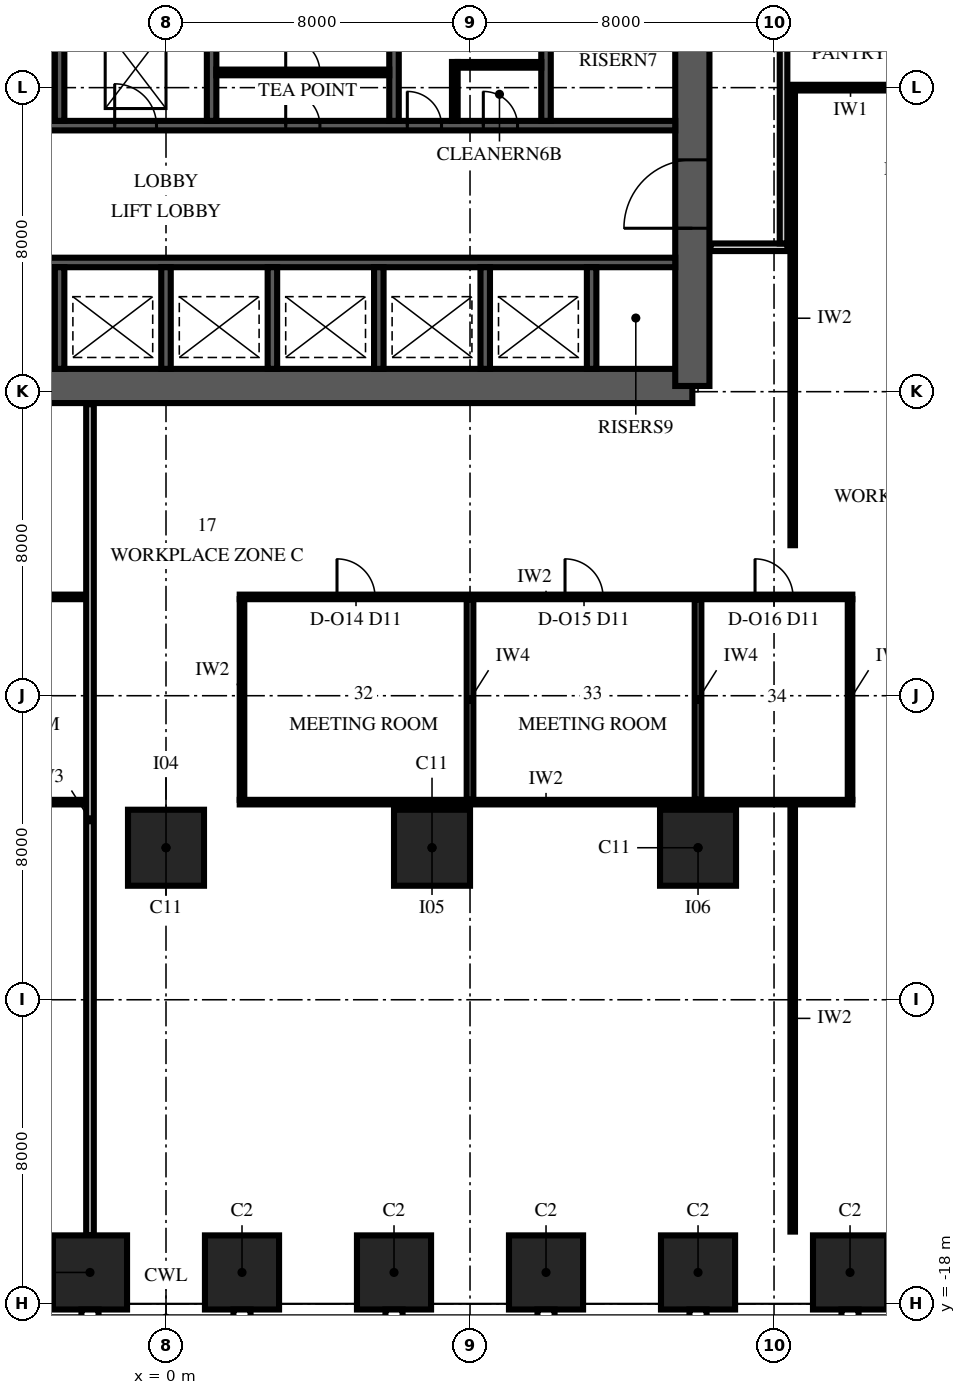
"""IFC4 building model, lengths in metres.
Left out: names, types, materials, properties, quantities, classifications, styles, units other than length and angle.
Written with IfcOpenShell. Run it as: python <this file> out.ifc"""

import sys

from ifc_helpers import new_model, si_unit, direction, frame, frame_2d, origin, origin_2d, place, context, subcontext, project, spatial, polyline, rectangle, outline, extrude, element, fill, save


model = new_model("IFC4")
c1 = context("Model", 3, precision=1e-05, world=origin(), true_north=direction((0.0, 1.0)))
c2 = subcontext(c1, "Body", "Model", "MODEL_VIEW")
j1 = project(units=[si_unit("LENGTHUNIT", "METRE"), si_unit("PLANEANGLEUNIT", "RADIAN")], contexts=[c1])
p1 = place(None, origin())
s1 = spatial("IfcSite", under=j1, at=p1, CompositionType="ELEMENT")
p2 = place(p1, origin())
s2 = spatial("IfcBuilding", under=s1, at=p2, CompositionType="ELEMENT")
p3 = place(p2, frame((0.0, 0.0, 60.0)))
s3 = spatial("IfcBuildingStorey", under=s2, at=p3, CompositionType="ELEMENT", Elevation=60.0)
for number, where, z_axis, x_axis in (
    (1, (-2.0, -17.175, 0.0), (0.0, 0.0, 1.0), (1.0, 0.0, 0.0)),
    (2, (2.0, -17.175, 0.0), (0.0, 0.0, 1.0), (1.0, 0.0, 0.0)),
    (3, (6.0, -17.175, 0.0), (0.0, 0.0, 1.0), (1.0, 0.0, 0.0)),
    (4, (10.0, -17.175, 0.0), (0.0, 0.0, 1.0), (1.0, 0.0, 0.0)),
    (5, (14.0, -17.175, 0.0), (0.0, 0.0, 1.0), (1.0, 0.0, 0.0)),
    (6, (18.0, -17.175, 0.0), (0.0, 0.0, 1.0), (1.0, 0.0, 0.0)),
):
    element("IfcColumn", number, at=place(p3, frame(where, z_axis=z_axis, x_axis=x_axis)), inside=s3, PredefinedType="COLUMN", context=c2, shape_type="SweptSolid", body=[
        extrude(rectangle(XDim=1.95, YDim=1.95, at=origin_2d()), origin(), (0.0, 0.0, 1.0), 4.0),
    ])
for number, where, z_axis, x_axis in (
    (7, (0.0, -6.0, 0.0), (0.0, 0.0, 1.0), (1.0, 0.0, 0.0)),
    (8, (7.0, -6.0, 0.0), (0.0, 0.0, 1.0), (1.0, 0.0, 0.0)),
    (9, (14.0, -6.0, 0.0), (0.0, 0.0, 1.0), (1.0, 0.0, 0.0)),
):
    element("IfcColumn", number, at=place(p3, frame(where, z_axis=z_axis, x_axis=x_axis)), inside=s3, PredefinedType="COLUMN", context=c2, shape_type="SweptSolid", body=[
        extrude(rectangle(XDim=2.0, YDim=2.0, at=origin_2d()), origin(), (0.0, 0.0, 1.0), 4.0),
    ])
p4 = place(p3, frame((-13.85, 6.15, 0.0), z_axis=(0.0, 0.0, 1.0), x_axis=(1.0, 0.0, 0.0)))
e10 = element("IfcWall", 10, at=p4, inside=s3, PredefinedType="SHEAR", context=c2, shape_type="SweptSolid", body=[
    extrude(rectangle(XDim=27.7, YDim=0.9, at=frame_2d((13.85, 0.0))), origin(), (0.0, 0.0, 1.0), 4.0),
])
p5 = place(p3, frame((13.85, 6.15, 0.0), z_axis=(0.0, 0.0, 1.0), x_axis=(0.0, 1.0, 0.0)))
e11 = element("IfcWall", 11, at=p5, inside=s3, PredefinedType="SHEAR", context=c2, shape_type="SweptSolid", body=[
    extrude(outline(polyline([(0.0, -0.45), (17.7, -0.45), (17.7, 0.0), (17.25, 0.0), (17.25, 0.45), (0.45, 0.45), (0.45, 0.0), (0.0, 0.0), (0.0, -0.45)])), origin(), (0.0, 0.0, 1.0), 4.0),
])
p6 = place(p5, frame((4.15, 0.0, 0.0)))
e12 = element("IfcOpeningElement", 12, at=p6, cuts=e11, PredefinedType="OPENING", context=c2, shape_type="SweptSolid", body=[
    extrude(rectangle(XDim=1.8, YDim=2.4, at=frame_2d((0.9, 1.2))), frame((0.0, 0.465, 0.0), z_axis=(0.0, -1.0, 0.0), x_axis=(1.0, 0.0, 0.0)), (0.0, 0.0, 1.0), 0.93),
])
p7 = place(p3, frame((-13.4, 9.4, 0.0), z_axis=(0.0, 0.0, 1.0), x_axis=(1.0, 0.0, 0.0)))
e13 = element("IfcWall", 13, at=p7, inside=s3, PredefinedType="SHEAR", context=c2, shape_type="SweptSolid", body=[
    extrude(rectangle(XDim=26.8, YDim=0.25, at=frame_2d((13.4, 0.0))), origin(), (0.0, 0.0, 1.0), 4.0),
])
p8 = place(p7, frame((0.25, 0.0, 0.0)))
e14 = element("IfcOpeningElement", 14, at=p8, cuts=e13, PredefinedType="OPENING", context=c2, shape_type="SweptSolid", body=[
    extrude(rectangle(XDim=1.1, YDim=2.1, at=frame_2d((0.55, 1.05))), frame((0.0, 0.14, 0.0), z_axis=(0.0, -1.0, 0.0), x_axis=(1.0, 0.0, 0.0)), (0.0, 0.0, 1.0), 0.28),
])
p9 = place(p7, frame((3.05, 0.0, 0.0)))
e15 = element("IfcOpeningElement", 15, at=p9, cuts=e13, PredefinedType="OPENING", context=c2, shape_type="SweptSolid", body=[
    extrude(rectangle(XDim=1.1, YDim=2.1, at=frame_2d((0.55, 1.05))), frame((0.0, 0.14, 0.0), z_axis=(0.0, -1.0, 0.0), x_axis=(1.0, 0.0, 0.0)), (0.0, 0.0, 1.0), 0.28),
])
p10 = place(p7, frame((5.85, 0.0, 0.0)))
e16 = element("IfcOpeningElement", 16, at=p10, cuts=e13, PredefinedType="OPENING", context=c2, shape_type="SweptSolid", body=[
    extrude(rectangle(XDim=1.1, YDim=2.1, at=frame_2d((0.55, 1.05))), frame((0.0, 0.14, 0.0), z_axis=(0.0, -1.0, 0.0), x_axis=(1.0, 0.0, 0.0)), (0.0, 0.0, 1.0), 0.28),
])
p11 = place(p3, frame((-13.4, 13.0, 0.0), z_axis=(0.0, 0.0, 1.0), x_axis=(1.0, 0.0, 0.0)))
e17 = element("IfcWall", 17, at=p11, inside=s3, PredefinedType="SHEAR", context=c2, shape_type="SweptSolid", body=[
    extrude(rectangle(XDim=26.8, YDim=0.25, at=frame_2d((13.4, 0.0))), origin(), (0.0, 0.0, 1.0), 4.0),
])
p12 = place(p11, frame((0.25, 0.0, 0.0)))
e18 = element("IfcOpeningElement", 18, at=p12, cuts=e17, PredefinedType="OPENING", context=c2, shape_type="SweptSolid", body=[
    extrude(rectangle(XDim=1.1, YDim=2.1, at=frame_2d((0.55, 1.05))), frame((0.0, 0.14, 0.0), z_axis=(0.0, -1.0, 0.0), x_axis=(1.0, 0.0, 0.0)), (0.0, 0.0, 1.0), 0.28),
])
p13 = place(p11, frame((8.65, 0.0, 0.0)))
e19 = element("IfcOpeningElement", 19, at=p13, cuts=e17, PredefinedType="OPENING", context=c2, shape_type="SweptSolid", body=[
    extrude(rectangle(XDim=1.1, YDim=2.1, at=frame_2d((0.55, 1.05))), frame((0.0, 0.14, 0.0), z_axis=(0.0, -1.0, 0.0), x_axis=(1.0, 0.0, 0.0)), (0.0, 0.0, 1.0), 0.28),
])
p14 = place(p11, frame((12.05, 0.0, 0.0)))
e20 = element("IfcOpeningElement", 20, at=p14, cuts=e17, PredefinedType="OPENING", context=c2, shape_type="SweptSolid", body=[
    extrude(rectangle(XDim=1.1, YDim=2.1, at=frame_2d((0.55, 1.05))), frame((0.0, 0.14, 0.0), z_axis=(0.0, -1.0, 0.0), x_axis=(1.0, 0.0, 0.0)), (0.0, 0.0, 1.0), 0.28),
])
p15 = place(p11, frame((16.55, 0.0, 0.0)))
e21 = element("IfcOpeningElement", 21, at=p15, cuts=e17, PredefinedType="OPENING", context=c2, shape_type="SweptSolid", body=[
    extrude(rectangle(XDim=0.9, YDim=2.1, at=frame_2d((0.45, 1.05))), frame((0.0, 0.14, 0.0), z_axis=(0.0, -1.0, 0.0), x_axis=(1.0, 0.0, 0.0)), (0.0, 0.0, 1.0), 0.28),
])
p16 = place(p11, frame((19.75, 0.0, 0.0)))
e22 = element("IfcOpeningElement", 22, at=p16, cuts=e17, PredefinedType="OPENING", context=c2, shape_type="SweptSolid", body=[
    extrude(rectangle(XDim=0.9, YDim=2.1, at=frame_2d((0.45, 1.05))), frame((0.0, 0.14, 0.0), z_axis=(0.0, -1.0, 0.0), x_axis=(1.0, 0.0, 0.0)), (0.0, 0.0, 1.0), 0.28),
])
p17 = place(p11, frame((21.75, 0.0, 0.0)))
e23 = element("IfcOpeningElement", 23, at=p17, cuts=e17, PredefinedType="OPENING", context=c2, shape_type="SweptSolid", body=[
    extrude(rectangle(XDim=0.9, YDim=2.1, at=frame_2d((0.45, 1.05))), frame((0.0, 0.14, 0.0), z_axis=(0.0, -1.0, 0.0), x_axis=(1.0, 0.0, 0.0)), (0.0, 0.0, 1.0), 0.28),
])
for number, where, z_axis, x_axis in (
    (24, (-2.8, 6.6, 0.0), (0.0, 0.0, 1.0), (0.0, 1.0, 0.0)),
    (25, (0.0, 6.6, 0.0), (0.0, 0.0, 1.0), (0.0, 1.0, 0.0)),
    (26, (2.8, 6.6, 0.0), (0.0, 0.0, 1.0), (0.0, 1.0, 0.0)),
    (27, (5.6, 6.6, 0.0), (0.0, 0.0, 1.0), (0.0, 1.0, 0.0)),
    (28, (8.4, 6.6, 0.0), (0.0, 0.0, 1.0), (0.0, 1.0, 0.0)),
    (29, (11.2, 6.6, 0.0), (0.0, 0.0, 1.0), (0.0, 1.0, 0.0)),
):
    element("IfcWall", number, at=place(p3, frame(where, z_axis=z_axis, x_axis=x_axis)), inside=s3, PredefinedType="SHEAR", context=c2, shape_type="SweptSolid", body=[
        extrude(rectangle(XDim=2.675, YDim=0.25, at=frame_2d((1.337, 0.0))), origin(), (0.0, 0.0, 1.0), 4.0),
    ])
for number, where, z_axis, x_axis in (
    (30, (-2.8, 13.125, 0.0), (0.0, 0.0, 1.0), (0.0, 1.0, 0.0)),
    (31, (1.2, 13.125, 0.0), (0.0, 0.0, 1.0), (0.0, 1.0, 0.0)),
    (32, (6.0, 13.125, 0.0), (0.0, 0.0, 1.0), (0.0, 1.0, 0.0)),
    (33, (10.0, 13.125, 0.0), (0.0, 0.0, 1.0), (0.0, 1.0, 0.0)),
):
    element("IfcWall", number, at=place(p3, frame(where, z_axis=z_axis, x_axis=x_axis)), inside=s3, PredefinedType="SHEAR", context=c2, shape_type="SweptSolid", body=[
        extrude(rectangle(XDim=2.75, YDim=0.25, at=frame_2d((1.375, 0.0))), origin(), (0.0, 0.0, 1.0), 4.0),
    ])
p18 = place(p3, frame((1.325, 14.4, 0.0), z_axis=(0.0, 0.0, 1.0), x_axis=(1.0, 0.0, 0.0)))
e34 = element("IfcWall", 34, at=p18, inside=s3, PredefinedType="PARTITIONING", context=c2, shape_type="SweptSolid", body=[
    extrude(rectangle(XDim=4.55, YDim=0.15, at=frame_2d((2.275, 0.0))), origin(), (0.0, 0.0, 1.0), 3.85),
])
p19 = place(p18, frame((1.825, 0.0, 0.0)))
e35 = element("IfcOpeningElement", 35, at=p19, cuts=e34, PredefinedType="OPENING", context=c2, shape_type="SweptSolid", body=[
    extrude(rectangle(XDim=0.9, YDim=2.1, at=frame_2d((0.45, 1.05))), frame((0.0, 0.09, 0.0), z_axis=(0.0, -1.0, 0.0), x_axis=(1.0, 0.0, 0.0)), (0.0, 0.0, 1.0), 0.18),
])
p20 = place(p3, frame((7.6, 13.125, 0.0), z_axis=(0.0, 0.0, 1.0), x_axis=(0.0, 1.0, 0.0)))
e36 = element("IfcWall", 36, at=p20, inside=s3, PredefinedType="PARTITIONING", context=c2, shape_type="SweptSolid", body=[
    extrude(rectangle(XDim=1.55, YDim=0.15, at=frame_2d((0.775, 0.0))), origin(), (0.0, 0.0, 1.0), 3.85),
])
p21 = place(p3, frame((7.675, 14.6, 0.0), z_axis=(0.0, 0.0, 1.0), x_axis=(1.0, 0.0, 0.0)))
e37 = element("IfcWall", 37, at=p21, inside=s3, PredefinedType="PARTITIONING", context=c2, shape_type="SweptSolid", body=[
    extrude(rectangle(XDim=2.2, YDim=0.15, at=frame_2d((1.1, 0.0))), origin(), (0.0, 0.0, 1.0), 3.85),
])
p22 = place(p3, frame((-14.06, -4.8, 0.0), z_axis=(0.0, 0.0, 1.0), x_axis=(1.0, 0.0, 0.0)))
e38 = element("IfcWall", 38, at=p22, inside=s3, PredefinedType="PARTITIONING", context=c2, shape_type="SweptSolid", body=[
    extrude(rectangle(XDim=11.96, YDim=0.12, at=frame_2d((5.98, 0.0))), origin(), (0.0, 0.0, 1.0), 3.25),
])
p23 = place(p3, frame((1.94, -4.8, 0.0), z_axis=(0.0, 0.0, 1.0), x_axis=(1.0, 0.0, 0.0)))
e39 = element("IfcWall", 39, at=p23, inside=s3, PredefinedType="PARTITIONING", context=c2, shape_type="SweptSolid", body=[
    extrude(rectangle(XDim=16.12, YDim=0.12, at=frame_2d((8.06, 0.0))), origin(), (0.0, 0.0, 1.0), 3.25),
])
p24 = place(p3, frame((-14.06, 0.6, 0.0), z_axis=(0.0, 0.0, 1.0), x_axis=(1.0, 0.0, 0.0)))
e40 = element("IfcWall", 40, at=p24, inside=s3, PredefinedType="PARTITIONING", context=c2, shape_type="SweptSolid", body=[
    extrude(rectangle(XDim=11.96, YDim=0.12, at=frame_2d((5.98, 0.0))), origin(), (0.0, 0.0, 1.0), 3.25),
])
p25 = place(p24, frame((2.56, 0.0, 0.0)))
e41 = element("IfcOpeningElement", 41, at=p25, cuts=e40, PredefinedType="OPENING", context=c2, shape_type="SweptSolid", body=[
    extrude(rectangle(XDim=1.0, YDim=2.4, at=frame_2d((0.5, 1.2))), frame((0.0, 0.075, 0.0), z_axis=(0.0, -1.0, 0.0), x_axis=(1.0, 0.0, 0.0)), (0.0, 0.0, 1.0), 0.15),
])
p26 = place(p24, frame((8.56, 0.0, 0.0)))
e42 = element("IfcOpeningElement", 42, at=p26, cuts=e40, PredefinedType="OPENING", context=c2, shape_type="SweptSolid", body=[
    extrude(rectangle(XDim=1.0, YDim=2.4, at=frame_2d((0.5, 1.2))), frame((0.0, 0.075, 0.0), z_axis=(0.0, -1.0, 0.0), x_axis=(1.0, 0.0, 0.0)), (0.0, 0.0, 1.0), 0.15),
])
p27 = place(p3, frame((1.94, 0.6, 0.0), z_axis=(0.0, 0.0, 1.0), x_axis=(1.0, 0.0, 0.0)))
e43 = element("IfcWall", 43, at=p27, inside=s3, PredefinedType="PARTITIONING", context=c2, shape_type="SweptSolid", body=[
    extrude(rectangle(XDim=16.12, YDim=0.12, at=frame_2d((8.06, 0.0))), origin(), (0.0, 0.0, 1.0), 3.25),
])
p28 = place(p27, frame((2.56, 0.0, 0.0)))
e44 = element("IfcOpeningElement", 44, at=p28, cuts=e43, PredefinedType="OPENING", context=c2, shape_type="SweptSolid", body=[
    extrude(rectangle(XDim=1.0, YDim=2.4, at=frame_2d((0.5, 1.2))), frame((0.0, 0.075, 0.0), z_axis=(0.0, -1.0, 0.0), x_axis=(1.0, 0.0, 0.0)), (0.0, 0.0, 1.0), 0.15),
])
p29 = place(p27, frame((8.56, 0.0, 0.0)))
e45 = element("IfcOpeningElement", 45, at=p29, cuts=e43, PredefinedType="OPENING", context=c2, shape_type="SweptSolid", body=[
    extrude(rectangle(XDim=1.0, YDim=2.4, at=frame_2d((0.5, 1.2))), frame((0.0, 0.075, 0.0), z_axis=(0.0, -1.0, 0.0), x_axis=(1.0, 0.0, 0.0)), (0.0, 0.0, 1.0), 0.15),
])
p30 = place(p27, frame((13.56, 0.0, 0.0)))
e46 = element("IfcOpeningElement", 46, at=p30, cuts=e43, PredefinedType="OPENING", context=c2, shape_type="SweptSolid", body=[
    extrude(rectangle(XDim=1.0, YDim=2.4, at=frame_2d((0.5, 1.2))), frame((0.0, 0.075, 0.0), z_axis=(0.0, -1.0, 0.0), x_axis=(1.0, 0.0, 0.0)), (0.0, 0.0, 1.0), 0.15),
])
p31 = place(p3, frame((14.33, 9.8, 0.0), z_axis=(0.0, 0.0, 1.0), x_axis=(1.0, 0.0, 0.0)))
e47 = element("IfcWall", 47, at=p31, inside=s3, PredefinedType="PARTITIONING", context=c2, shape_type="SweptSolid", body=[
    extrude(rectangle(XDim=2.02, YDim=0.2, at=frame_2d((1.01, 0.0))), origin(), (0.0, 0.0, 1.0), 3.85),
])
p32 = place(p3, frame((16.35, 14.0, 0.0), z_axis=(0.0, 0.0, 1.0), x_axis=(1.0, 0.0, 0.0)))
e48 = element("IfcWall", 48, at=p32, inside=s3, PredefinedType="PARTITIONING", context=c2, shape_type="SweptSolid", body=[
    extrude(rectangle(XDim=3.325, YDim=0.15, at=frame_2d((1.663, 0.0))), origin(), (0.0, 0.0, 1.0), 3.85),
])
p33 = place(p3, frame((-2.0, -16.2, 0.0), z_axis=(0.0, 0.0, 1.0), x_axis=(0.0, 1.0, 0.0)))
e49 = element("IfcWall", 49, at=p33, inside=s3, PredefinedType="PARTITIONING", context=c2, shape_type="SweptSolid", body=[
    extrude(rectangle(XDim=21.87, YDim=0.2, at=frame_2d((10.935, 0.0))), origin(), (0.0, 0.0, 1.0), 2.842),
])
p34 = place(p3, frame((2.0, -4.74, 0.0), z_axis=(0.0, 0.0, 1.0), x_axis=(0.0, 1.0, 0.0)))
e50 = element("IfcWall", 50, at=p34, inside=s3, PredefinedType="PARTITIONING", context=c2, shape_type="SweptSolid", body=[
    extrude(rectangle(XDim=5.28, YDim=0.12, at=frame_2d((2.64, 0.0))), origin(), (0.0, 0.0, 1.0), 3.25),
])
p35 = place(p3, frame((8.0, -4.74, 0.0), z_axis=(0.0, 0.0, 1.0), x_axis=(0.0, 1.0, 0.0)))
e51 = element("IfcWall", 51, at=p35, inside=s3, PredefinedType="PARTITIONING", context=c2, shape_type="SweptSolid", body=[
    extrude(rectangle(XDim=5.28, YDim=0.175, at=frame_2d((2.64, 0.0))), origin(), (0.0, 0.0, 1.0), 3.85),
])
p36 = place(p3, frame((14.0, -4.74, 0.0), z_axis=(0.0, 0.0, 1.0), x_axis=(0.0, 1.0, 0.0)))
e52 = element("IfcWall", 52, at=p36, inside=s3, PredefinedType="PARTITIONING", context=c2, shape_type="SweptSolid", body=[
    extrude(rectangle(XDim=5.28, YDim=0.175, at=frame_2d((2.64, 0.0))), origin(), (0.0, 0.0, 1.0), 3.25),
])
p37 = place(p3, frame((16.25, 9.9, 0.0), z_axis=(0.0, 0.0, 1.0), x_axis=(0.0, 1.0, 0.0)))
e53 = element("IfcWall", 53, at=p37, inside=s3, PredefinedType="PARTITIONING", context=c2, shape_type="SweptSolid", body=[
    extrude(rectangle(XDim=16.25, YDim=0.2, at=frame_2d((8.125, 0.0))), origin(), (0.0, 0.0, 1.0), 3.25),
])
p38 = place(p3, frame((18.0, -4.74, 0.0), z_axis=(0.0, 0.0, 1.0), x_axis=(0.0, 1.0, 0.0)))
e54 = element("IfcWall", 54, at=p38, inside=s3, PredefinedType="PARTITIONING", context=c2, shape_type="SweptSolid", body=[
    extrude(rectangle(XDim=5.28, YDim=0.12, at=frame_2d((2.64, 0.0))), origin(), (0.0, 0.0, 1.0), 3.25),
])
p39 = place(p3, frame((16.491, -16.1, 0.0), z_axis=(0.0, 0.0, 1.0), x_axis=(0.0, 1.0, 0.0)))
e55 = element("IfcWall", 55, at=p39, inside=s3, PredefinedType="PARTITIONING", context=c2, shape_type="SweptSolid", body=[
    extrude(rectangle(XDim=11.22, YDim=0.12, at=frame_2d((5.61, 0.0))), origin(), (0.0, 0.0, 1.0), 2.842),
])
p40 = place(p3, frame((16.491, 1.96, 0.0), z_axis=(0.0, 0.0, 1.0), x_axis=(0.0, 1.0, 0.0)))
e56 = element("IfcWall", 56, at=p40, inside=s3, PredefinedType="PARTITIONING", context=c2, shape_type="SweptSolid", body=[
    extrude(rectangle(XDim=11.945, YDim=0.12, at=frame_2d((5.973, 0.0))), origin(), (0.0, 0.0, 1.0), 2.842),
])
p41 = place(p6, origin())
e57 = element("IfcDoor", 57, at=p41, inside=s3, OperationType="DOUBLE_DOOR_SINGLE_SWING", PredefinedType="DOOR", context=c2, shape_type="SweptSolid", body=[
    extrude(rectangle(XDim=1.8, YDim=2.4, at=frame_2d((0.9, 1.2))), frame((0.0, 0.45, 0.0), z_axis=(0.0, -1.0, 0.0), x_axis=(1.0, 0.0, 0.0)), (0.0, 0.0, 1.0), 0.899),
])
fill(e12, e57)
p42 = place(p14, origin())
e58 = element("IfcDoor", 58, at=p42, inside=s3, OperationType="SLIDING_TO_LEFT", PredefinedType="DOOR", context=c2, shape_type="SweptSolid", body=[
    extrude(rectangle(XDim=1.1, YDim=2.1, at=frame_2d((0.55, 1.05))), frame((0.0, 0.125, 0.0), z_axis=(0.0, -1.0, 0.0), x_axis=(1.0, 0.0, 0.0)), (0.0, 0.0, 1.0), 0.25),
])
fill(e20, e58)
p43 = place(p15, origin())
e59 = element("IfcDoor", 59, at=p43, inside=s3, OperationType="SINGLE_SWING_LEFT", PredefinedType="DOOR", context=c2, shape_type="SweptSolid", body=[
    extrude(rectangle(XDim=0.9, YDim=2.1, at=frame_2d((0.45, 1.05))), frame((0.0, 0.125, 0.0), z_axis=(0.0, -1.0, 0.0), x_axis=(1.0, 0.0, 0.0)), (0.0, 0.0, 1.0), 0.25),
])
fill(e21, e59)
p44 = place(p19, origin())
e60 = element("IfcDoor", 60, at=p44, inside=s3, OperationType="SINGLE_SWING_LEFT", PredefinedType="DOOR", context=c2, shape_type="SweptSolid", body=[
    extrude(rectangle(XDim=0.9, YDim=2.1, at=frame_2d((0.45, 1.05))), frame((0.0, 0.075, 0.0), z_axis=(0.0, -1.0, 0.0), x_axis=(1.0, 0.0, 0.0)), (0.0, 0.0, 1.0), 0.149),
])
fill(e35, e60)
p45 = place(p16, origin())
e61 = element("IfcDoor", 61, at=p45, inside=s3, OperationType="SINGLE_SWING_LEFT", PredefinedType="DOOR", context=c2, shape_type="SweptSolid", body=[
    extrude(rectangle(XDim=0.9, YDim=2.1, at=frame_2d((0.45, 1.05))), frame((0.0, 0.125, 0.0), z_axis=(0.0, -1.0, 0.0), x_axis=(1.0, 0.0, 0.0)), (0.0, 0.0, 1.0), 0.25),
])
fill(e22, e61)
p46 = place(p17, origin())
e62 = element("IfcDoor", 62, at=p46, inside=s3, OperationType="SINGLE_SWING_LEFT", PredefinedType="DOOR", context=c2, shape_type="SweptSolid", body=[
    extrude(rectangle(XDim=0.9, YDim=2.1, at=frame_2d((0.45, 1.05))), frame((0.0, 0.125, 0.0), z_axis=(0.0, -1.0, 0.0), x_axis=(1.0, 0.0, 0.0)), (0.0, 0.0, 1.0), 0.25),
])
fill(e23, e62)
p47 = place(p28, origin())
e63 = element("IfcDoor", 63, at=p47, inside=s3, OperationType="SINGLE_SWING_RIGHT", PredefinedType="DOOR", context=c2, shape_type="SweptSolid", body=[
    extrude(rectangle(XDim=1.0, YDim=2.4, at=frame_2d((0.5, 1.2))), frame((0.0, 0.06, 0.0), z_axis=(0.0, -1.0, 0.0), x_axis=(1.0, 0.0, 0.0)), (0.0, 0.0, 1.0), 0.12),
])
fill(e44, e63)
p48 = place(p29, origin())
e64 = element("IfcDoor", 64, at=p48, inside=s3, OperationType="SINGLE_SWING_RIGHT", PredefinedType="DOOR", context=c2, shape_type="SweptSolid", body=[
    extrude(rectangle(XDim=1.0, YDim=2.4, at=frame_2d((0.5, 1.2))), frame((0.0, 0.06, 0.0), z_axis=(0.0, -1.0, 0.0), x_axis=(1.0, 0.0, 0.0)), (0.0, 0.0, 1.0), 0.12),
])
fill(e45, e64)
p49 = place(p30, origin())
e65 = element("IfcDoor", 65, at=p49, inside=s3, OperationType="SINGLE_SWING_RIGHT", PredefinedType="DOOR", context=c2, shape_type="SweptSolid", body=[
    extrude(rectangle(XDim=1.0, YDim=2.4, at=frame_2d((0.5, 1.2))), frame((0.0, 0.06, 0.0), z_axis=(0.0, -1.0, 0.0), x_axis=(1.0, 0.0, 0.0)), (0.0, 0.0, 1.0), 0.12),
])
fill(e46, e65)
save(model, sys.argv[1])
